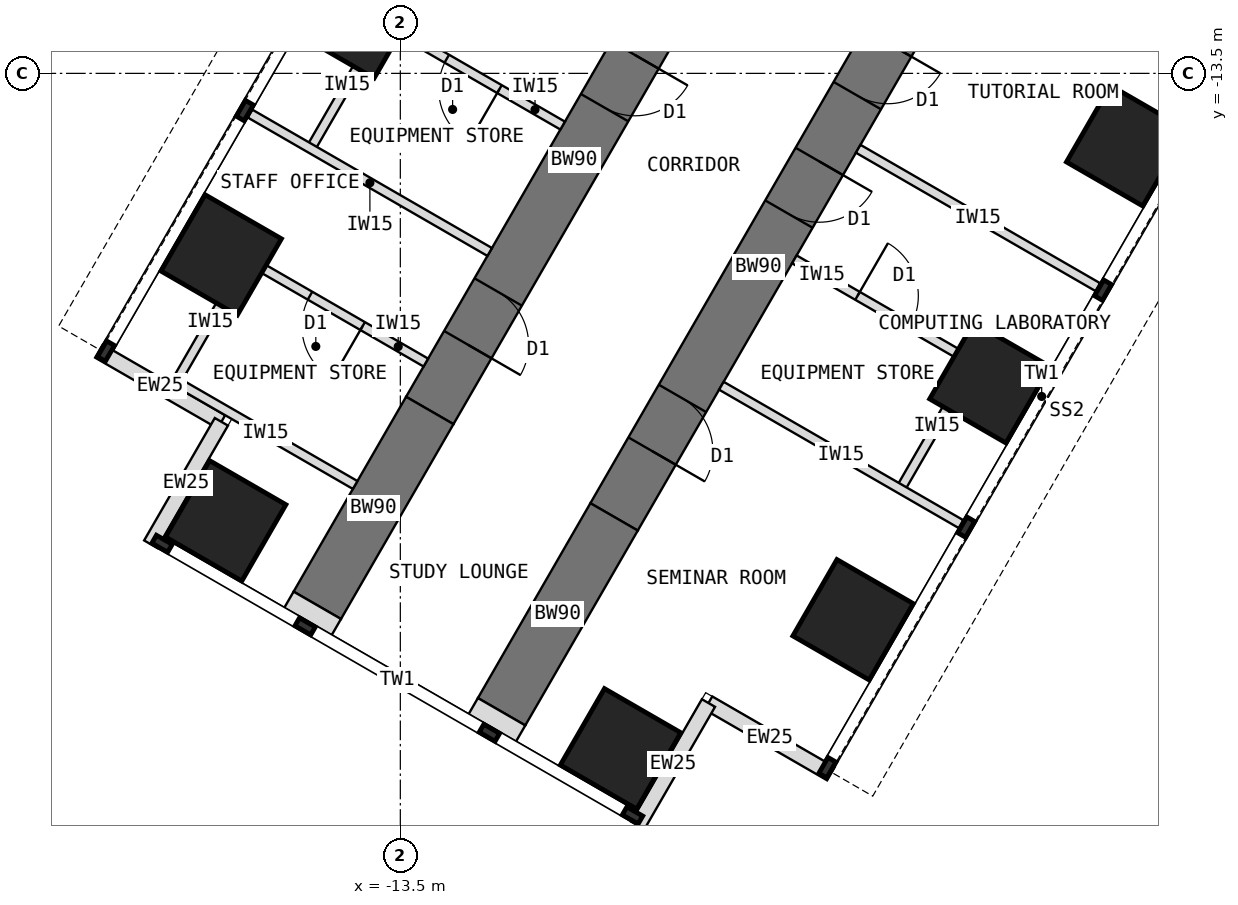
"""IFC4 building model, lengths in metres.
Left out: names, types, materials, properties, quantities, classifications, styles, units other than length and angle.
Written with IfcOpenShell. Run it as: python <this file> out.ifc"""

import sys

from ifc_helpers import new_model, si_unit, direction, frame, frame_2d, origin, origin_2d, place, context, subcontext, project, spatial, rectangle, extrude, element, fill, save


model = new_model("IFC4")
c1 = context("Model", 3, precision=1e-05, world=origin(), true_north=direction((0.0, 1.0)))
c2 = subcontext(c1, "Body", "Model", "MODEL_VIEW")
j1 = project(units=[si_unit("LENGTHUNIT", "METRE"), si_unit("PLANEANGLEUNIT", "RADIAN")], contexts=[c1])
p1 = place(None, origin())
s1 = spatial("IfcSite", under=j1, at=p1, CompositionType="ELEMENT")
p2 = place(p1, origin())
s2 = spatial("IfcBuilding", under=s1, at=p2, CompositionType="ELEMENT")
p3 = place(p2, frame((0.0, 0.0, 64.5)))
s3 = spatial("IfcBuildingStorey", under=s2, at=p3, CompositionType="ELEMENT", Elevation=64.5)
p4 = place(p3, frame((-5.234, -12.566, 0.0), z_axis=(0.0, 0.0, 1.0), x_axis=(-0.499997557548, -0.86602681393, 0.0)))
e1 = element("IfcWall", 1, at=p4, inside=s3, PredefinedType="SHEAR", context=c2, shape_type="SweptSolid", body=[
    extrude(rectangle(XDim=9.5, YDim=0.9, at=frame_2d((4.75, 0.0))), origin(), (0.0, 0.0, 1.0), 4.0),
])
p5 = place(p4, frame((0.5, 0.0, 0.0)))
e2 = element("IfcOpeningElement", 2, at=p5, cuts=e1, PredefinedType="OPENING", context=c2, shape_type="SweptSolid", body=[
    extrude(rectangle(XDim=1.0, YDim=2.1, at=frame_2d((0.5, 1.05))), frame((0.0, 0.46, 0.0), z_axis=(0.0, -1.0, 0.0), x_axis=(1.0, 0.0, 0.0)), (0.0, 0.0, 1.0), 0.92),
])
p6 = place(p4, frame((2.75, 0.0, 0.0)))
e3 = element("IfcOpeningElement", 3, at=p6, cuts=e1, PredefinedType="OPENING", context=c2, shape_type="SweptSolid", body=[
    extrude(rectangle(XDim=1.0, YDim=2.1, at=frame_2d((0.5, 1.05))), frame((0.0, 0.46, 0.0), z_axis=(0.0, -1.0, 0.0), x_axis=(1.0, 0.0, 0.0)), (0.0, 0.0, 1.0), 0.92),
])
p7 = place(p4, frame((7.25, 0.0, 0.0)))
e4 = element("IfcOpeningElement", 4, at=p7, cuts=e1, PredefinedType="OPENING", context=c2, shape_type="SweptSolid", body=[
    extrude(rectangle(XDim=1.0, YDim=2.1, at=frame_2d((0.5, 1.05))), frame((0.0, 0.46, 0.0), z_axis=(0.0, -1.0, 0.0), x_axis=(1.0, 0.0, 0.0)), (0.0, 0.0, 1.0), 0.92),
])
p8 = place(p3, frame((-9.984, -20.794, 0.0), z_axis=(0.0, 0.0, 1.0), x_axis=(-0.500042316284, -0.866000971088, 0.0)))
e5 = element("IfcWall", 5, at=p8, inside=s3, PredefinedType="SHEAR", context=c2, shape_type="SweptSolid", body=[
    extrude(rectangle(XDim=3.7, YDim=0.9, at=frame_2d((1.85, 0.0))), origin(), (0.0, 0.0, 1.0), 4.0),
])
p9 = place(p3, frame((-8.266, -10.816, 0.0), z_axis=(0.0, 0.0, 1.0), x_axis=(-0.499997557548, -0.86602681393, 0.0)))
e6 = element("IfcWall", 6, at=p9, inside=s3, PredefinedType="SHEAR", context=c2, shape_type="SweptSolid", body=[
    extrude(rectangle(XDim=9.5, YDim=0.9, at=frame_2d((4.75, 0.0))), origin(), (0.0, 0.0, 1.0), 4.0),
])
p10 = place(p9, frame((0.5, 0.0, 0.0)))
e7 = element("IfcOpeningElement", 7, at=p10, cuts=e6, PredefinedType="OPENING", context=c2, shape_type="SweptSolid", body=[
    extrude(rectangle(XDim=1.0, YDim=2.1, at=frame_2d((0.5, 1.05))), frame((0.0, 0.46, 0.0), z_axis=(0.0, -1.0, 0.0), x_axis=(1.0, 0.0, 0.0)), (0.0, 0.0, 1.0), 0.92),
])
p11 = place(p9, frame((2.75, 0.0, 0.0)))
e8 = element("IfcOpeningElement", 8, at=p11, cuts=e6, PredefinedType="OPENING", context=c2, shape_type="SweptSolid", body=[
    extrude(rectangle(XDim=1.0, YDim=2.1, at=frame_2d((0.5, 1.05))), frame((0.0, 0.46, 0.0), z_axis=(0.0, -1.0, 0.0), x_axis=(1.0, 0.0, 0.0)), (0.0, 0.0, 1.0), 0.92),
])
p12 = place(p9, frame((7.25, 0.0, 0.0)))
e9 = element("IfcOpeningElement", 9, at=p12, cuts=e6, PredefinedType="OPENING", context=c2, shape_type="SweptSolid", body=[
    extrude(rectangle(XDim=1.0, YDim=2.1, at=frame_2d((0.5, 1.05))), frame((0.0, 0.46, 0.0), z_axis=(0.0, -1.0, 0.0), x_axis=(1.0, 0.0, 0.0)), (0.0, 0.0, 1.0), 0.92),
])
p13 = place(p3, frame((-13.016, -19.044, 0.0), z_axis=(0.0, 0.0, 1.0), x_axis=(-0.499992827086, -0.866029545028, 0.0)))
e10 = element("IfcWall", 10, at=p13, inside=s3, PredefinedType="SHEAR", context=c2, shape_type="SweptSolid", body=[
    extrude(rectangle(XDim=3.7, YDim=0.9, at=frame_2d((1.85, 0.0))), origin(), (0.0, 0.0, 1.0), 4.0),
])
for number, where, z_axis, x_axis in (
    (11, (-1.554, -14.691, 0.0), (0.0, 0.0, 1.0), (0.5, 0.866, 0.0)),
    (12, (-3.804, -18.588, 0.0), (0.0, 0.0, 1.0), (0.5, 0.866, 0.0)),
    (13, (-14.196, -12.588, 0.0), (0.0, 0.0, 1.0), (0.5, 0.866, 0.0)),
    (14, (-6.054, -22.486, 0.0), (0.0, 0.0, 1.0), (0.5, 0.866, 0.0)),
    (15, (-16.446, -16.486, 0.0), (0.0, 0.0, 1.0), (0.5, 0.866, 0.0)),
    (16, (-9.877, -24.608, 0.0), (0.0, 0.0, 1.0), (0.5, 0.866, 0.0)),
    (17, (-16.373, -20.858, 0.0), (0.0, 0.0, 1.0), (0.5, 0.866, 0.0)),
):
    element("IfcColumn", number, at=place(p3, frame(where, z_axis=z_axis, x_axis=x_axis)), inside=s3, PredefinedType="COLUMN", context=c2, shape_type="SweptSolid", body=[
        extrude(rectangle(XDim=1.45, YDim=1.45, at=origin_2d()), origin(), (0.0, 0.0, 1.0), 4.0),
    ])
for number, where, z_axis, x_axis in (
    (18, (-6.419, -25.017, 0.0), (0.0, 0.0, 1.0), (-0.866, 0.5, 0.0)),
    (19, (-8.432, -23.855, 0.0), (0.0, 0.0, 1.0), (-0.5, -0.866, 0.0)),
    (20, (-18.456, -18.067, 0.0), (0.0, 0.0, 1.0), (0.866, -0.5, 0.0)),
    (21, (-16.443, -19.23, 0.0), (0.0, 0.0, 1.0), (-0.5, -0.866, 0.0)),
):
    element("IfcWall", number, at=place(p3, frame(where, z_axis=z_axis, x_axis=x_axis)), inside=s3, PredefinedType="STANDARD", context=c2, shape_type="SweptSolid", body=[
        extrude(rectangle(XDim=2.325, YDim=0.25, at=frame_2d((1.163, 0.0))), origin(), (0.0, 0.0, 1.0), 3.8),
    ])
for number, where, z_axis, x_axis in (
    (22, (-11.834, -23.998, 0.0), (0.0, 0.0, 1.0), (-0.5, -0.866, 0.0)),
    (23, (-14.865, -22.248, 0.0), (0.0, 0.0, 1.0), (-0.5, -0.866, 0.0)),
):
    element("IfcWall", number, at=place(p3, frame(where, z_axis=z_axis, x_axis=x_axis)), inside=s3, PredefinedType="PARTITIONING", context=c2, shape_type="SweptSolid", body=[
        extrude(rectangle(XDim=0.31, YDim=0.9, at=frame_2d((0.155, 0.0))), origin(), (0.0, 0.0, 1.0), 3.8),
    ])
for number, where, z_axis, x_axis in (
    (24, (-5.97, -14.74, 0.0), (0.0, 0.0, 1.0), (0.866, -0.5, 0.0)),
    (25, (-8.22, -18.637, 0.0), (0.0, 0.0, 1.0), (0.866, -0.5, 0.0)),
):
    element("IfcWall", number, at=place(p3, frame(where, z_axis=z_axis, x_axis=x_axis)), inside=s3, PredefinedType="PARTITIONING", context=c2, shape_type="SweptSolid", body=[
        extrude(rectangle(XDim=4.55, YDim=0.15, at=frame_2d((2.275, 0.0))), origin(), (0.0, 0.0, 1.0), 3.8),
    ])
p14 = place(p3, frame((-4.075, -18.259, 0.0), z_axis=(0.0, 0.0, 1.0), x_axis=(-0.500001309137, -0.866024647952, 0.0)))
e26 = element("IfcWall", 26, at=p14, inside=s3, PredefinedType="PARTITIONING", context=c2, shape_type="SweptSolid", body=[
    extrude(rectangle(XDim=2.4, YDim=0.15, at=frame_2d((1.2, 0.0))), origin(), (0.0, 0.0, 1.0), 3.8),
])
p15 = place(p3, frame((-7.02, -16.559, 0.0), z_axis=(0.0, 0.0, 1.0), x_axis=(0.866038511948, -0.499977295307, 0.0)))
e27 = element("IfcWall", 27, at=p15, inside=s3, PredefinedType="PARTITIONING", context=c2, shape_type="SweptSolid", body=[
    extrude(rectangle(XDim=3.4, YDim=0.15, at=frame_2d((1.7, 0.0))), origin(), (0.0, 0.0, 1.0), 3.8),
])
p16 = place(p15, frame((1.2, 0.0, 0.0)))
e28 = element("IfcOpeningElement", 28, at=p16, cuts=e27, PredefinedType="OPENING", context=c2, shape_type="SweptSolid", body=[
    extrude(rectangle(XDim=1.0, YDim=2.1, at=frame_2d((0.5, 1.05))), frame((0.0, 0.085, 0.0), z_axis=(0.0, -1.0, 0.0), x_axis=(1.0, 0.0, 0.0)), (0.0, 0.0, 1.0), 0.17),
])
p17 = place(p3, frame((-12.03, -16.437, 0.0), z_axis=(0.0, 0.0, 1.0), x_axis=(-0.866035472144, 0.499982560684, 0.0)))
e29 = element("IfcWall", 29, at=p17, inside=s3, PredefinedType="PARTITIONING", context=c2, shape_type="SweptSolid", body=[
    extrude(rectangle(XDim=4.55, YDim=0.15, at=frame_2d((2.275, 0.0))), origin(), (0.0, 0.0, 1.0), 3.8),
])
p18 = place(p3, frame((-13.775, -12.658, 0.0), z_axis=(0.0, 0.0, 1.0), x_axis=(-0.500033551112, -0.866006032174, 0.0)))
e30 = element("IfcWall", 30, at=p18, inside=s3, PredefinedType="PARTITIONING", context=c2, shape_type="SweptSolid", body=[
    extrude(rectangle(XDim=2.4, YDim=0.15, at=frame_2d((1.2, 0.0))), origin(), (0.0, 0.0, 1.0), 3.8),
])
p19 = place(p3, frame((-10.83, -14.359, 0.0), z_axis=(0.0, 0.0, 1.0), x_axis=(-0.865989465428, 0.500062241894, 0.0)))
e31 = element("IfcWall", 31, at=p19, inside=s3, PredefinedType="PARTITIONING", context=c2, shape_type="SweptSolid", body=[
    extrude(rectangle(XDim=3.4, YDim=0.15, at=frame_2d((1.7, 0.0))), origin(), (0.0, 0.0, 1.0), 3.8),
])
p20 = place(p19, frame((1.2, 0.0, 0.0)))
e32 = element("IfcOpeningElement", 32, at=p20, cuts=e31, PredefinedType="OPENING", context=c2, shape_type="SweptSolid", body=[
    extrude(rectangle(XDim=1.0, YDim=2.1, at=frame_2d((0.5, 1.05))), frame((0.0, 0.085, 0.0), z_axis=(0.0, -1.0, 0.0), x_axis=(1.0, 0.0, 0.0)), (0.0, 0.0, 1.0), 0.17),
])
p21 = place(p3, frame((-16.025, -16.556, 0.0), z_axis=(0.0, 0.0, 1.0), x_axis=(-0.500077600433, -0.865980596518, 0.0)))
e33 = element("IfcWall", 33, at=p21, inside=s3, PredefinedType="PARTITIONING", context=c2, shape_type="SweptSolid", body=[
    extrude(rectangle(XDim=2.4, YDim=0.15, at=frame_2d((1.2, 0.0))), origin(), (0.0, 0.0, 1.0), 3.8),
])
p22 = place(p3, frame((-13.08, -18.256, 0.0), z_axis=(0.0, 0.0, 1.0), x_axis=(-0.866020560687, 0.500008388397, 0.0)))
e34 = element("IfcWall", 34, at=p22, inside=s3, PredefinedType="PARTITIONING", context=c2, shape_type="SweptSolid", body=[
    extrude(rectangle(XDim=3.4, YDim=0.15, at=frame_2d((1.7, 0.0))), origin(), (0.0, 0.0, 1.0), 3.8),
])
p23 = place(p22, frame((1.2, 0.0, 0.0)))
e35 = element("IfcOpeningElement", 35, at=p23, cuts=e34, PredefinedType="OPENING", context=c2, shape_type="SweptSolid", body=[
    extrude(rectangle(XDim=1.0, YDim=2.1, at=frame_2d((0.5, 1.05))), frame((0.0, 0.085, 0.0), z_axis=(0.0, -1.0, 0.0), x_axis=(1.0, 0.0, 0.0)), (0.0, 0.0, 1.0), 0.17),
])
p24 = place(p3, frame((-14.243, -20.269, 0.0), z_axis=(0.0, 0.0, 1.0), x_axis=(-0.866007419912, 0.500031147688, 0.0)))
e36 = element("IfcWall", 36, at=p24, inside=s3, PredefinedType="PARTITIONING", context=c2, shape_type="SweptSolid", body=[
    extrude(rectangle(XDim=3.4, YDim=0.15, at=frame_2d((1.7, 0.0))), origin(), (0.0, 0.0, 1.0), 3.8),
])
p25 = place(p16, origin())
e37 = element("IfcDoor", 37, at=p25, inside=s3, OperationType="SINGLE_SWING_LEFT", PredefinedType="DOOR", context=c2, shape_type="SweptSolid", body=[
    extrude(rectangle(XDim=1.0, YDim=2.1, at=frame_2d((0.5, 1.05))), frame((0.0, 0.025, 0.0), z_axis=(0.0, -1.0, 0.0), x_axis=(1.0, 0.0, 0.0)), (0.0, 0.0, 1.0), 0.05),
])
fill(e28, e37)
p26 = place(p20, origin())
e38 = element("IfcDoor", 38, at=p26, inside=s3, OperationType="SINGLE_SWING_LEFT", PredefinedType="DOOR", context=c2, shape_type="SweptSolid", body=[
    extrude(rectangle(XDim=1.0, YDim=2.1, at=frame_2d((0.5, 1.05))), frame((0.0, 0.025, 0.0), z_axis=(0.0, -1.0, 0.0), x_axis=(1.0, 0.0, 0.0)), (0.0, 0.0, 1.0), 0.05),
])
fill(e32, e38)
p27 = place(p23, origin())
e39 = element("IfcDoor", 39, at=p27, inside=s3, OperationType="SINGLE_SWING_LEFT", PredefinedType="DOOR", context=c2, shape_type="SweptSolid", body=[
    extrude(rectangle(XDim=1.0, YDim=2.1, at=frame_2d((0.5, 1.05))), frame((0.0, 0.025, 0.0), z_axis=(0.0, -1.0, 0.0), x_axis=(1.0, 0.0, 0.0)), (0.0, 0.0, 1.0), 0.05),
])
fill(e35, e39)
p28 = place(p5, origin())
e40 = element("IfcDoor", 40, at=p28, inside=s3, OperationType="SINGLE_SWING_LEFT", PredefinedType="DOOR", context=c2, shape_type="SweptSolid", body=[
    extrude(rectangle(XDim=0.92, YDim=2.06, at=frame_2d((0.5, 1.03))), frame((0.0, 0.025, 0.0), z_axis=(0.0, -1.0, 0.0), x_axis=(1.0, 0.0, 0.0)), (0.0, 0.0, 1.0), 0.05),
    extrude(rectangle(XDim=0.04, YDim=2.1, at=frame_2d((0.02, 1.05))), frame((0.0, 0.45, 0.0), z_axis=(0.0, -1.0, 0.0), x_axis=(1.0, 0.0, 0.0)), (0.0, 0.0, 1.0), 0.899),
    extrude(rectangle(XDim=0.04, YDim=2.1, at=frame_2d((0.98, 1.05))), frame((0.0, 0.45, 0.0), z_axis=(0.0, -1.0, 0.0), x_axis=(1.0, 0.0, 0.0)), (0.0, 0.0, 1.0), 0.899),
    extrude(rectangle(XDim=0.92, YDim=0.04, at=frame_2d((0.5, 2.08))), frame((0.0, 0.45, 0.0), z_axis=(0.0, -1.0, 0.0), x_axis=(1.0, 0.0, 0.0)), (0.0, 0.0, 1.0), 0.899),
])
fill(e2, e40)
p29 = place(p6, origin())
e41 = element("IfcDoor", 41, at=p29, inside=s3, OperationType="SINGLE_SWING_LEFT", PredefinedType="DOOR", context=c2, shape_type="SweptSolid", body=[
    extrude(rectangle(XDim=0.92, YDim=2.06, at=frame_2d((0.5, 1.03))), frame((0.0, 0.025, 0.0), z_axis=(0.0, -1.0, 0.0), x_axis=(1.0, 0.0, 0.0)), (0.0, 0.0, 1.0), 0.05),
    extrude(rectangle(XDim=0.04, YDim=2.1, at=frame_2d((0.02, 1.05))), frame((0.0, 0.45, 0.0), z_axis=(0.0, -1.0, 0.0), x_axis=(1.0, 0.0, 0.0)), (0.0, 0.0, 1.0), 0.899),
    extrude(rectangle(XDim=0.04, YDim=2.1, at=frame_2d((0.98, 1.05))), frame((0.0, 0.45, 0.0), z_axis=(0.0, -1.0, 0.0), x_axis=(1.0, 0.0, 0.0)), (0.0, 0.0, 1.0), 0.899),
    extrude(rectangle(XDim=0.92, YDim=0.04, at=frame_2d((0.5, 2.08))), frame((0.0, 0.45, 0.0), z_axis=(0.0, -1.0, 0.0), x_axis=(1.0, 0.0, 0.0)), (0.0, 0.0, 1.0), 0.899),
])
fill(e3, e41)
p30 = place(p7, origin())
e42 = element("IfcDoor", 42, at=p30, inside=s3, OperationType="SINGLE_SWING_RIGHT", PredefinedType="DOOR", context=c2, shape_type="SweptSolid", body=[
    extrude(rectangle(XDim=0.92, YDim=2.06, at=frame_2d((0.5, 1.03))), frame((0.0, 0.025, 0.0), z_axis=(0.0, -1.0, 0.0), x_axis=(1.0, 0.0, 0.0)), (0.0, 0.0, 1.0), 0.05),
    extrude(rectangle(XDim=0.04, YDim=2.1, at=frame_2d((0.02, 1.05))), frame((0.0, 0.45, 0.0), z_axis=(0.0, -1.0, 0.0), x_axis=(1.0, 0.0, 0.0)), (0.0, 0.0, 1.0), 0.899),
    extrude(rectangle(XDim=0.04, YDim=2.1, at=frame_2d((0.98, 1.05))), frame((0.0, 0.45, 0.0), z_axis=(0.0, -1.0, 0.0), x_axis=(1.0, 0.0, 0.0)), (0.0, 0.0, 1.0), 0.899),
    extrude(rectangle(XDim=0.92, YDim=0.04, at=frame_2d((0.5, 2.08))), frame((0.0, 0.45, 0.0), z_axis=(0.0, -1.0, 0.0), x_axis=(1.0, 0.0, 0.0)), (0.0, 0.0, 1.0), 0.899),
])
fill(e4, e42)
p31 = place(p11, origin())
e43 = element("IfcDoor", 43, at=p31, inside=s3, OperationType="SINGLE_SWING_LEFT", PredefinedType="DOOR", context=c2, shape_type="SweptSolid", body=[
    extrude(rectangle(XDim=0.92, YDim=2.06, at=frame_2d((0.5, 1.03))), frame((0.0, 0.025, 0.0), z_axis=(0.0, -1.0, 0.0), x_axis=(1.0, 0.0, 0.0)), (0.0, 0.0, 1.0), 0.05),
    extrude(rectangle(XDim=0.04, YDim=2.1, at=frame_2d((0.02, 1.05))), frame((0.0, 0.45, 0.0), z_axis=(0.0, -1.0, 0.0), x_axis=(1.0, 0.0, 0.0)), (0.0, 0.0, 1.0), 0.899),
    extrude(rectangle(XDim=0.04, YDim=2.1, at=frame_2d((0.98, 1.05))), frame((0.0, 0.45, 0.0), z_axis=(0.0, -1.0, 0.0), x_axis=(1.0, 0.0, 0.0)), (0.0, 0.0, 1.0), 0.899),
    extrude(rectangle(XDim=0.92, YDim=0.04, at=frame_2d((0.5, 2.08))), frame((0.0, 0.45, 0.0), z_axis=(0.0, -1.0, 0.0), x_axis=(1.0, 0.0, 0.0)), (0.0, 0.0, 1.0), 0.899),
])
fill(e8, e43)
p32 = place(p12, origin())
e44 = element("IfcDoor", 44, at=p32, inside=s3, OperationType="SINGLE_SWING_RIGHT", PredefinedType="DOOR", context=c2, shape_type="SweptSolid", body=[
    extrude(rectangle(XDim=0.92, YDim=2.06, at=frame_2d((0.5, 1.03))), frame((0.0, 0.025, 0.0), z_axis=(0.0, -1.0, 0.0), x_axis=(1.0, 0.0, 0.0)), (0.0, 0.0, 1.0), 0.05),
    extrude(rectangle(XDim=0.04, YDim=2.1, at=frame_2d((0.02, 1.05))), frame((0.0, 0.45, 0.0), z_axis=(0.0, -1.0, 0.0), x_axis=(1.0, 0.0, 0.0)), (0.0, 0.0, 1.0), 0.899),
    extrude(rectangle(XDim=0.04, YDim=2.1, at=frame_2d((0.98, 1.05))), frame((0.0, 0.45, 0.0), z_axis=(0.0, -1.0, 0.0), x_axis=(1.0, 0.0, 0.0)), (0.0, 0.0, 1.0), 0.899),
    extrude(rectangle(XDim=0.92, YDim=0.04, at=frame_2d((0.5, 2.08))), frame((0.0, 0.45, 0.0), z_axis=(0.0, -1.0, 0.0), x_axis=(1.0, 0.0, 0.0)), (0.0, 0.0, 1.0), 0.899),
])
fill(e9, e44)
save(model, sys.argv[1])
